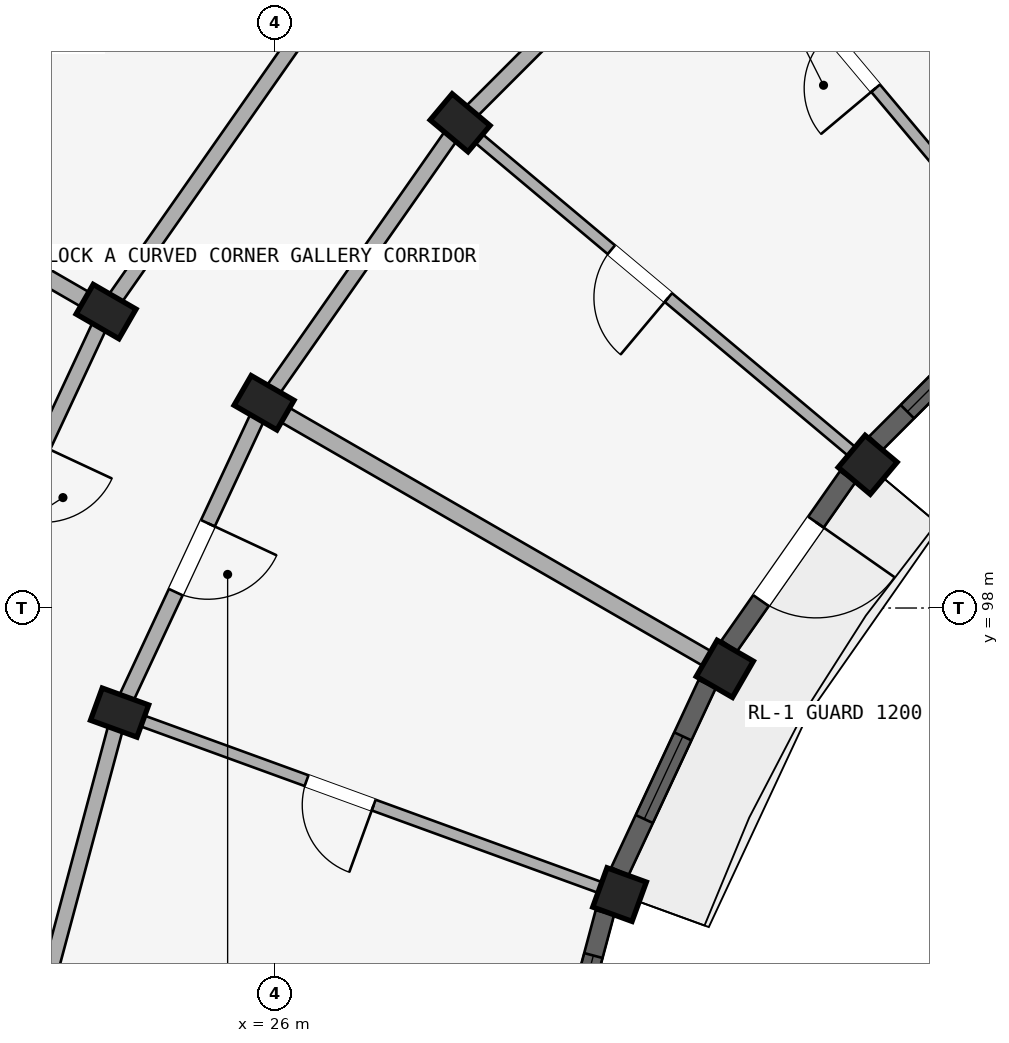
"""IFC4 building model, lengths in metres.
Left out: names, types, materials, properties, quantities, classifications, styles, units other than length and angle.
Written with IfcOpenShell. Run it as: python <this file> out.ifc"""

import sys

from ifc_helpers import new_model, si_unit, direction, frame, frame_2d, origin, origin_2d, place, context, subcontext, project, spatial, rectangle, extrude, element, fill, save


model = new_model("IFC4")
c1 = context("Model", 3, precision=1e-05, world=origin(), true_north=direction((0.0, 1.0)))
c2 = subcontext(c1, "Body", "Model", "MODEL_VIEW")
j1 = project(units=[si_unit("LENGTHUNIT", "METRE"), si_unit("PLANEANGLEUNIT", "RADIAN")], contexts=[c1])
p1 = place(None, origin())
s1 = spatial("IfcSite", under=j1, at=p1, CompositionType="ELEMENT")
p2 = place(p1, origin())
s2 = spatial("IfcBuilding", under=s1, at=p2, CompositionType="ELEMENT")
p3 = place(p2, frame((0.0, 0.0, 37.05)))
s3 = spatial("IfcBuildingStorey", under=s2, at=p3, CompositionType="ELEMENT", Elevation=37.05)
p4 = place(p3, frame((33.798, 99.885, 0.0), z_axis=(0.0, 0.0, 1.0), x_axis=(0.642787609687, 0.766044443119, 0.0)))
e1 = element("IfcColumn", 1, at=p4, inside=s3, PredefinedType="COLUMN", context=c2, shape_type="SweptSolid", body=[
    extrude(rectangle(XDim=0.55, YDim=0.55, at=origin_2d()), origin(), (0.0, 0.0, 1.0), 2.93),
])
p5 = place(p3, frame((28.436, 104.384, 0.0), z_axis=(0.0, 0.0, 1.0), x_axis=(0.642787609687, 0.766044443119, 0.0)))
e2 = element("IfcColumn", 2, at=p5, inside=s3, PredefinedType="COLUMN", context=c2, shape_type="SweptSolid", body=[
    extrude(rectangle(XDim=0.45, YDim=0.65, at=origin_2d()), origin(), (0.0, 0.0, 1.0), 2.93),
])
p6 = place(p3, frame((31.919, 97.2, 0.0), z_axis=(0.0, 0.0, 1.0), x_axis=(0.5, 0.866025403784, 0.0)))
e3 = element("IfcColumn", 3, at=p6, inside=s3, PredefinedType="COLUMN", context=c2, shape_type="SweptSolid", body=[
    extrude(rectangle(XDim=0.55, YDim=0.55, at=origin_2d()), origin(), (0.0, 0.0, 1.0), 2.93),
])
for number, where, z_axis, x_axis in (
    (4, (25.856, 100.7, 0.0), (0.0, 0.0, 1.0), (0.5, 0.866, 0.0)),
    (5, (23.778, 101.9, 0.0), (0.0, 0.0, 1.0), (0.5, 0.866, 0.0)),
):
    element("IfcColumn", number, at=place(p3, frame(where, z_axis=z_axis, x_axis=x_axis)), inside=s3, PredefinedType="COLUMN", context=c2, shape_type="SweptSolid", body=[
        extrude(rectangle(XDim=0.45, YDim=0.65, at=origin_2d()), origin(), (0.0, 0.0, 1.0), 2.93),
    ])
p7 = place(p3, frame((30.534, 94.23, 0.0), z_axis=(0.0, 0.0, 1.0), x_axis=(0.342020143326, 0.939692620786, 0.0)))
e6 = element("IfcColumn", 6, at=p7, inside=s3, PredefinedType="COLUMN", context=c2, shape_type="SweptSolid", body=[
    extrude(rectangle(XDim=0.55, YDim=0.55, at=origin_2d()), origin(), (0.0, 0.0, 1.0), 2.93),
])
p8 = place(p3, frame((23.956, 96.624, 0.0), z_axis=(0.0, 0.0, 1.0), x_axis=(0.342020143326, 0.939692620786, 0.0)))
e7 = element("IfcColumn", 7, at=p8, inside=s3, PredefinedType="COLUMN", context=c2, shape_type="SweptSolid", body=[
    extrude(rectangle(XDim=0.45, YDim=0.65, at=origin_2d()), origin(), (0.0, 0.0, 1.0), 2.93),
])
p9 = place(p3, frame((31.616, 107.564, 0.0), z_axis=(0.0, 0.0, 1.0), x_axis=(-0.707106781187, -0.707106781187, 0.0)))
e8 = element("IfcWall", 8, at=p9, inside=s3, PredefinedType="STANDARD", context=c2, shape_type="SweptSolid", body=[
    extrude(rectangle(XDim=4.497, YDim=0.2, at=frame_2d((2.249, 0.0))), origin(), (0.0, 0.0, 1.0), 2.372),
])
p10 = place(p3, frame((28.436, 104.384, 0.0), z_axis=(0.0, 0.0, 1.0), x_axis=(-0.573571637217, -0.819155404658, 0.0)))
e9 = element("IfcWall", 9, at=p10, inside=s3, PredefinedType="STANDARD", context=c2, shape_type="SweptSolid", body=[
    extrude(rectangle(XDim=4.497, YDim=0.2, at=frame_2d((2.249, 0.0))), origin(), (0.0, 0.0, 1.0), 2.372),
])
p11 = place(p3, frame((26.598, 105.927, 0.0), z_axis=(0.0, 0.0, 1.0), x_axis=(-0.573592335331, -0.819140911474, 0.0)))
e10 = element("IfcWall", 10, at=p11, inside=s3, PredefinedType="STANDARD", context=c2, shape_type="SweptSolid", body=[
    extrude(rectangle(XDim=4.916, YDim=0.2, at=frame_2d((2.458, 0.0))), origin(), (0.0, 0.0, 1.0), 2.372),
])
p12 = place(p3, frame((25.856, 100.7, 0.0), z_axis=(0.0, 0.0, 1.0), x_axis=(-0.422617978463, -0.906307919131, 0.0)))
e11 = element("IfcWall", 11, at=p12, inside=s3, PredefinedType="STANDARD", context=c2, shape_type="SweptSolid", body=[
    extrude(rectangle(XDim=4.497, YDim=0.2, at=frame_2d((2.249, 0.0))), origin(), (0.0, 0.0, 1.0), 2.372),
])
p13 = place(p12, frame((1.749, 0.0, 0.0)))
e12 = element("IfcOpeningElement", 12, at=p13, cuts=e11, PredefinedType="OPENING", context=c2, shape_type="SweptSolid", body=[
    extrude(rectangle(XDim=1.0, YDim=2.15, at=frame_2d((0.5, 1.075))), frame((0.0, 0.11, 0.0), z_axis=(0.0, -1.0, 0.0), x_axis=(1.0, 0.0, 0.0)), (0.0, 0.0, 1.0), 0.22),
])
p14 = place(p3, frame((23.778, 101.9, 0.0), z_axis=(0.0, 0.0, 1.0), x_axis=(-0.422629854778, -0.906302381024, 0.0)))
e13 = element("IfcWall", 13, at=p14, inside=s3, PredefinedType="STANDARD", context=c2, shape_type="SweptSolid", body=[
    extrude(rectangle(XDim=4.915, YDim=0.2, at=frame_2d((2.458, 0.0))), origin(), (0.0, 0.0, 1.0), 2.372),
])
p15 = place(p14, frame((1.958, 0.0, 0.0)))
e14 = element("IfcOpeningElement", 14, at=p15, cuts=e13, PredefinedType="OPENING", context=c2, shape_type="SweptSolid", body=[
    extrude(rectangle(XDim=1.0, YDim=2.15, at=frame_2d((0.5, 1.075))), frame((0.0, 0.11, 0.0), z_axis=(0.0, -1.0, 0.0), x_axis=(1.0, 0.0, 0.0)), (0.0, 0.0, 1.0), 0.22),
])
p16 = place(p3, frame((23.956, 96.624, 0.0), z_axis=(0.0, 0.0, 1.0), x_axis=(-0.258787642463, -0.965934240054, 0.0)))
e15 = element("IfcWall", 15, at=p16, inside=s3, PredefinedType="STANDARD", context=c2, shape_type="SweptSolid", body=[
    extrude(rectangle(XDim=4.497, YDim=0.2, at=frame_2d((2.249, 0.0))), origin(), (0.0, 0.0, 1.0), 2.372),
])
p17 = place(p3, frame((35.987, 102.355, 0.0), z_axis=(0.0, 0.0, 1.0), x_axis=(-0.642784846501, 0.766046761698, 0.0)))
e16 = element("IfcWall", 16, at=p17, inside=s3, PredefinedType="PARTITIONING", context=c2, shape_type="SweptSolid", body=[
    extrude(rectangle(XDim=6.75, YDim=0.15, at=frame_2d((3.375, 0.0))), origin(), (0.0, 0.0, 1.0), 2.372),
])
p18 = place(p17, frame((3.242, 0.0, 0.0)))
e17 = element("IfcOpeningElement", 17, at=p18, cuts=e16, PredefinedType="OPENING", context=c2, shape_type="SweptSolid", body=[
    extrude(rectangle(XDim=0.94, YDim=2.1, at=frame_2d((0.47, 1.05))), frame((0.0, 0.085, 0.0), z_axis=(0.0, -1.0, 0.0), x_axis=(1.0, 0.0, 0.0)), (0.0, 0.0, 1.0), 0.17),
])
p19 = place(p3, frame((33.645, 100.013, 0.0), z_axis=(0.0, 0.0, 1.0), x_axis=(-0.766046761698, 0.642784846501, 0.0)))
e18 = element("IfcWall", 18, at=p19, inside=s3, PredefinedType="PARTITIONING", context=c2, shape_type="SweptSolid", body=[
    extrude(rectangle(XDim=6.75, YDim=0.15, at=frame_2d((3.375, 0.0))), origin(), (0.0, 0.0, 1.0), 2.372),
])
p20 = place(p19, frame((3.222, 0.0, 0.0)))
e19 = element("IfcOpeningElement", 19, at=p20, cuts=e18, PredefinedType="OPENING", context=c2, shape_type="SweptSolid", body=[
    extrude(rectangle(XDim=0.98, YDim=2.12, at=frame_2d((0.49, 1.06))), frame((0.0, 0.085, 0.0), z_axis=(0.0, -1.0, 0.0), x_axis=(1.0, 0.0, 0.0)), (0.0, 0.0, 1.0), 0.17),
])
p21 = place(p3, frame((31.746, 97.3, 0.0), z_axis=(0.0, 0.0, 1.0), x_axis=(-0.866026575979, 0.499997969693, 0.0)))
e20 = element("IfcWall", 20, at=p21, inside=s3, PredefinedType="STANDARD", context=c2, shape_type="SweptSolid", body=[
    extrude(rectangle(XDim=6.75, YDim=0.22, at=frame_2d((3.375, 0.0))), origin(), (0.0, 0.0, 1.0), 2.372),
])
p22 = place(p3, frame((23.691, 101.95, 0.0), z_axis=(0.0, 0.0, 1.0), x_axis=(-0.866026648973, 0.499997843263, 0.0)))
e21 = element("IfcWall", 21, at=p22, inside=s3, PredefinedType="STANDARD", context=c2, shape_type="SweptSolid", body=[
    extrude(rectangle(XDim=17.42, YDim=0.22, at=frame_2d((8.71, 0.0))), origin(), (0.0, 0.0, 1.0), 2.372),
])
p23 = place(p3, frame((30.346, 94.298, 0.0), z_axis=(0.0, 0.0, 1.0), x_axis=(-0.939696231917, 0.342010221662, 0.0)))
e22 = element("IfcWall", 22, at=p23, inside=s3, PredefinedType="PARTITIONING", context=c2, shape_type="SweptSolid", body=[
    extrude(rectangle(XDim=6.75, YDim=0.15, at=frame_2d((3.375, 0.0))), origin(), (0.0, 0.0, 1.0), 2.372),
])
p24 = place(p23, frame((3.242, 0.0, 0.0)))
e23 = element("IfcOpeningElement", 23, at=p24, cuts=e22, PredefinedType="OPENING", context=c2, shape_type="SweptSolid", body=[
    extrude(rectangle(XDim=0.94, YDim=2.1, at=frame_2d((0.47, 1.05))), frame((0.0, 0.085, 0.0), z_axis=(0.0, -1.0, 0.0), x_axis=(1.0, 0.0, 0.0)), (0.0, 0.0, 1.0), 0.17),
])
p25 = place(p3, frame((35.83, 102.093, 0.0), z_axis=(0.0, 0.0, 1.0), x_axis=(-0.707106781187, -0.707106781187, 0.0)))
e24 = element("IfcWall", 24, at=p25, inside=s3, PredefinedType="STANDARD", context=c2, shape_type="SweptSolid", body=[
    extrude(rectangle(XDim=2.72, YDim=0.25, at=frame_2d((1.36, 0.0))), origin(), (0.0, 0.0, 1.0), 2.422),
])
p26 = place(p25, frame((0.585, 0.0, 0.622)))
e25 = element("IfcOpeningElement", 25, at=p26, cuts=e24, PredefinedType="OPENING", context=c2, shape_type="SweptSolid", body=[
    extrude(rectangle(XDim=1.55, YDim=1.6, at=frame_2d((0.775, 0.8))), frame((0.0, 0.135, 0.0), z_axis=(0.0, -1.0, 0.0), x_axis=(1.0, 0.0, 0.0)), (0.0, 0.0, 1.0), 0.27),
])
p27 = place(p3, frame((33.536, 99.728, 0.0), z_axis=(0.0, 0.0, 1.0), x_axis=(-0.573612950921, -0.819126475299, 0.0)))
e26 = element("IfcWall", 26, at=p27, inside=s3, PredefinedType="STANDARD", context=c2, shape_type="SweptSolid", body=[
    extrude(rectangle(XDim=2.72, YDim=0.25, at=frame_2d((1.36, 0.0))), origin(), (0.0, 0.0, 1.0), 2.422),
])
p28 = place(p27, frame((0.73, 0.0, 0.0)))
e27 = element("IfcOpeningElement", 27, at=p28, cuts=e26, PredefinedType="OPENING", context=c2, shape_type="SweptSolid", body=[
    extrude(rectangle(XDim=1.26, YDim=2.15, at=frame_2d((0.63, 1.075))), frame((0.0, 0.135, 0.0), z_axis=(0.0, -1.0, 0.0), x_axis=(1.0, 0.0, 0.0)), (0.0, 0.0, 1.0), 0.27),
])
p29 = place(p3, frame((31.688, 97.0, 0.0), z_axis=(0.0, 0.0, 1.0), x_axis=(-0.422629903269, -0.906302358412, 0.0)))
e28 = element("IfcWall", 28, at=p29, inside=s3, PredefinedType="STANDARD", context=c2, shape_type="SweptSolid", body=[
    extrude(rectangle(XDim=2.72, YDim=0.25, at=frame_2d((1.36, 0.0))), origin(), (0.0, 0.0, 1.0), 2.422),
])
p30 = place(p29, frame((0.76, 0.0, 0.722)))
e29 = element("IfcOpeningElement", 29, at=p30, cuts=e28, PredefinedType="OPENING", context=c2, shape_type="SweptSolid", body=[
    extrude(rectangle(XDim=1.2, YDim=1.5, at=frame_2d((0.6, 0.75))), frame((0.0, 0.135, 0.0), z_axis=(0.0, -1.0, 0.0), x_axis=(1.0, 0.0, 0.0)), (0.0, 0.0, 1.0), 0.27),
])
p31 = place(p3, frame((30.341, 93.993, 0.0), z_axis=(0.0, 0.0, 1.0), x_axis=(-0.258807879411, -0.965928818058, 0.0)))
e30 = element("IfcWall", 30, at=p31, inside=s3, PredefinedType="STANDARD", context=c2, shape_type="SweptSolid", body=[
    extrude(rectangle(XDim=2.72, YDim=0.25, at=frame_2d((1.36, 0.0))), origin(), (0.0, 0.0, 1.0), 2.422),
])
p32 = place(p31, frame((0.585, 0.0, 0.622)))
e31 = element("IfcOpeningElement", 31, at=p32, cuts=e30, PredefinedType="OPENING", context=c2, shape_type="SweptSolid", body=[
    extrude(rectangle(XDim=1.55, YDim=1.6, at=frame_2d((0.775, 0.8))), frame((0.0, 0.135, 0.0), z_axis=(0.0, -1.0, 0.0), x_axis=(1.0, 0.0, 0.0)), (0.0, 0.0, 1.0), 0.27),
])
p33 = place(p26, origin())
e32 = element("IfcWindow", 32, at=p33, inside=s3, PartitioningType="DOUBLE_PANEL_VERTICAL", PredefinedType="WINDOW", context=c2, shape_type="SweptSolid", body=[
    extrude(rectangle(XDim=1.55, YDim=1.6, at=frame_2d((0.775, 0.8))), frame((0.0, 0.03, 0.0), z_axis=(0.0, -1.0, 0.0), x_axis=(1.0, 0.0, 0.0)), (0.0, 0.0, 1.0), 0.06),
])
fill(e25, e32)
p34 = place(p30, origin())
e33 = element("IfcWindow", 33, at=p34, inside=s3, PartitioningType="SINGLE_PANEL", PredefinedType="WINDOW", context=c2, shape_type="SweptSolid", body=[
    extrude(rectangle(XDim=1.2, YDim=1.5, at=frame_2d((0.6, 0.75))), frame((0.0, 0.03, 0.0), z_axis=(0.0, -1.0, 0.0), x_axis=(1.0, 0.0, 0.0)), (0.0, 0.0, 1.0), 0.06),
])
fill(e29, e33)
p35 = place(p32, origin())
e34 = element("IfcWindow", 34, at=p35, inside=s3, PartitioningType="DOUBLE_PANEL_VERTICAL", PredefinedType="WINDOW", context=c2, shape_type="SweptSolid", body=[
    extrude(rectangle(XDim=1.55, YDim=1.6, at=frame_2d((0.775, 0.8))), frame((0.0, 0.03, 0.0), z_axis=(0.0, -1.0, 0.0), x_axis=(1.0, 0.0, 0.0)), (0.0, 0.0, 1.0), 0.06),
])
fill(e31, e34)
p36 = place(p18, frame((0.94, 0.0, 0.0), z_axis=(0.0, 0.0, 1.0), x_axis=(-1.0, 0.0, 0.0)))
e35 = element("IfcDoor", 35, at=p36, inside=s3, OperationType="SINGLE_SWING_RIGHT", PredefinedType="DOOR", context=c2, shape_type="SweptSolid", body=[
    extrude(rectangle(XDim=0.94, YDim=2.1, at=frame_2d((0.47, 1.05))), frame((0.0, 0.025, 0.0), z_axis=(0.0, -1.0, 0.0), x_axis=(1.0, 0.0, 0.0)), (0.0, 0.0, 1.0), 0.05),
])
fill(e17, e35)
p37 = place(p20, origin())
e36 = element("IfcDoor", 36, at=p37, inside=s3, OperationType="SINGLE_SWING_LEFT", PredefinedType="DOOR", context=c2, shape_type="SweptSolid", body=[
    extrude(rectangle(XDim=0.98, YDim=2.12, at=frame_2d((0.49, 1.06))), frame((0.0, 0.025, 0.0), z_axis=(0.0, -1.0, 0.0), x_axis=(1.0, 0.0, 0.0)), (0.0, 0.0, 1.0), 0.05),
])
fill(e19, e36)
p38 = place(p24, origin())
e37 = element("IfcDoor", 37, at=p38, inside=s3, OperationType="SINGLE_SWING_LEFT", PredefinedType="DOOR", context=c2, shape_type="SweptSolid", body=[
    extrude(rectangle(XDim=0.94, YDim=2.1, at=frame_2d((0.47, 1.05))), frame((0.0, 0.025, 0.0), z_axis=(0.0, -1.0, 0.0), x_axis=(1.0, 0.0, 0.0)), (0.0, 0.0, 1.0), 0.05),
])
fill(e23, e37)
p39 = place(p13, frame((1.0, 0.0, 0.0), z_axis=(0.0, 0.0, 1.0), x_axis=(-1.0, 0.0, 0.0)))
e38 = element("IfcDoor", 38, at=p39, inside=s3, OperationType="SINGLE_SWING_RIGHT", PredefinedType="DOOR", context=c2, shape_type="SweptSolid", body=[
    extrude(rectangle(XDim=1.0, YDim=2.15, at=frame_2d((0.5, 1.075))), frame((0.0, 0.025, 0.0), z_axis=(0.0, -1.0, 0.0), x_axis=(1.0, 0.0, 0.0)), (0.0, 0.0, 1.0), 0.05),
])
fill(e12, e38)
p40 = place(p28, origin())
e39 = element("IfcDoor", 39, at=p40, inside=s3, OperationType="SINGLE_SWING_LEFT", PredefinedType="DOOR", context=c2, shape_type="SweptSolid", body=[
    extrude(rectangle(XDim=1.26, YDim=2.15, at=frame_2d((0.63, 1.075))), frame((0.0, 0.025, 0.0), z_axis=(0.0, -1.0, 0.0), x_axis=(1.0, 0.0, 0.0)), (0.0, 0.0, 1.0), 0.05),
])
fill(e27, e39)
save(model, sys.argv[1])
